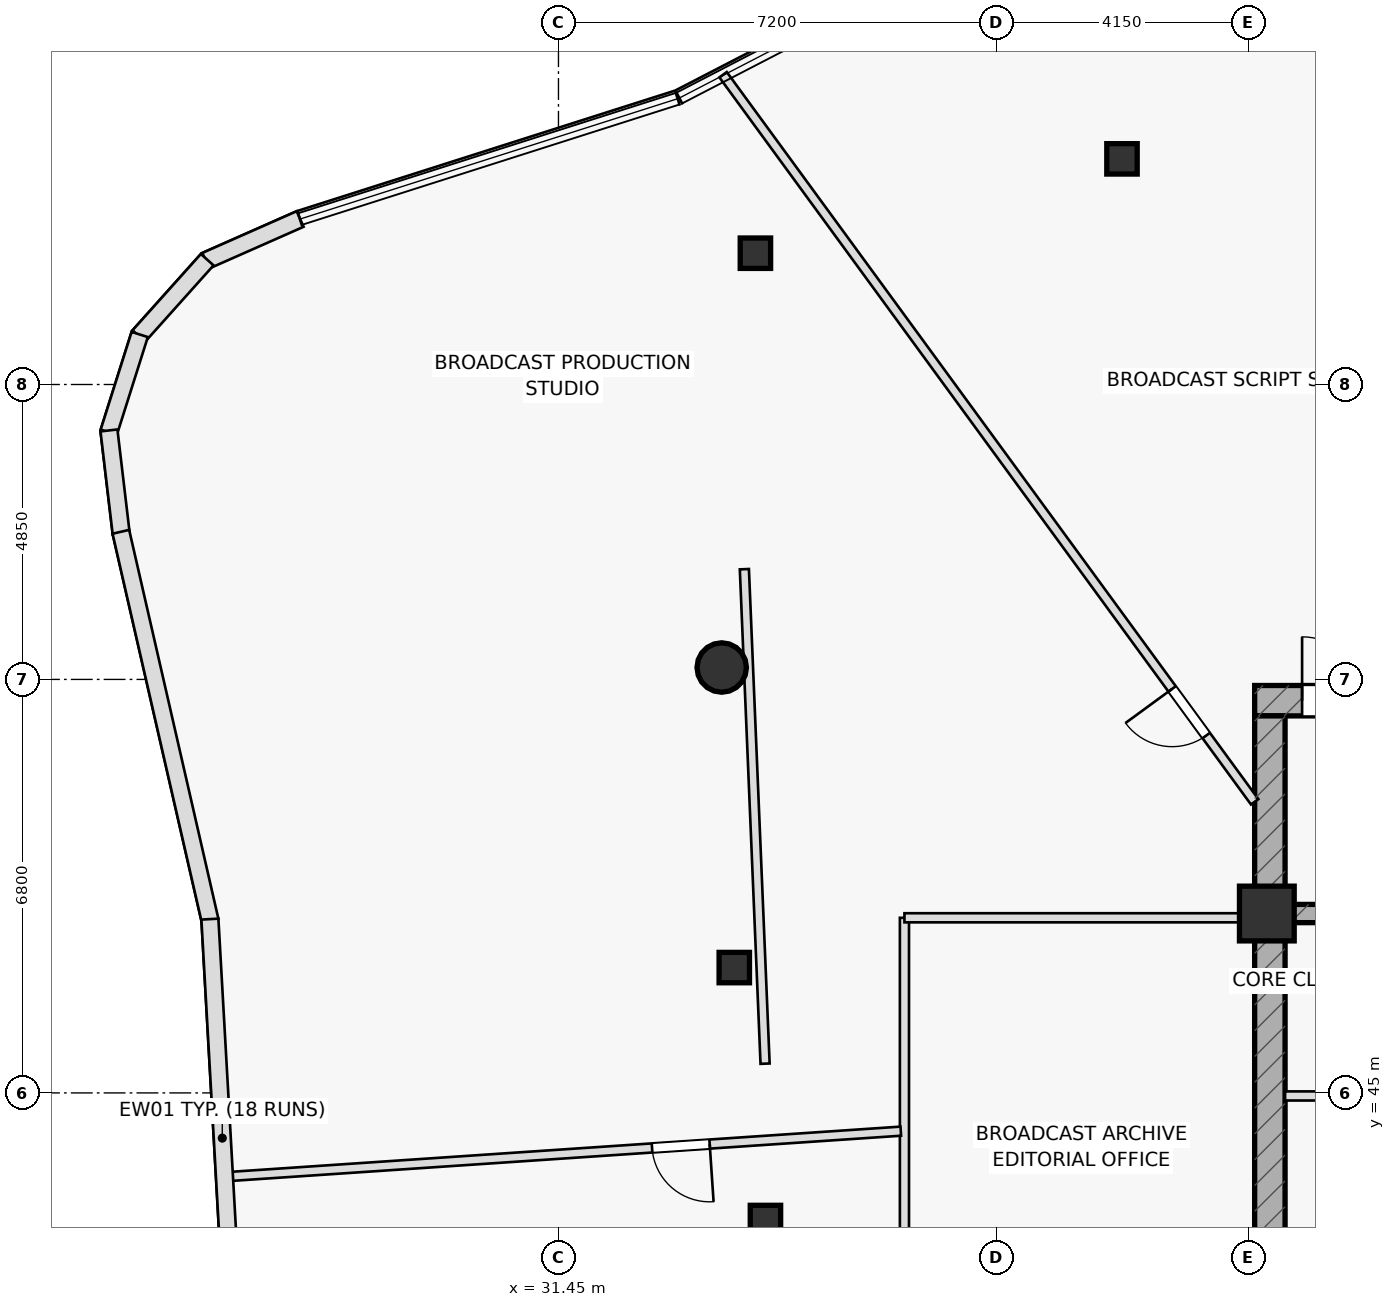
"""IFC4 building model, lengths in metres.
Left out: names, types, materials, properties, quantities, classifications, styles, units other than length and angle.
Written with IfcOpenShell. Run it as: python <this file> out.ifc"""

import sys

from ifc_helpers import new_model, si_unit, direction, frame, frame_2d, origin, origin_2d, place, context, subcontext, project, spatial, rectangle, hollow_rectangle, hollow_circle, extrude, element, fill, save


model = new_model("IFC4")
c1 = context("Model", 3, precision=1e-05, world=origin(), true_north=direction((0.0, 1.0)))
c2 = subcontext(c1, "Body", "Model", "MODEL_VIEW")
j1 = project(units=[si_unit("LENGTHUNIT", "METRE"), si_unit("PLANEANGLEUNIT", "RADIAN")], contexts=[c1])
p1 = place(None, origin())
s1 = spatial("IfcSite", under=j1, at=p1, CompositionType="ELEMENT")
p2 = place(p1, origin())
s2 = spatial("IfcBuilding", under=s1, at=p2, CompositionType="ELEMENT")
p3 = place(p2, frame((0.0, 0.0, 297.5)))
s3 = spatial("IfcBuildingStorey", under=s2, at=p3, CompositionType="ELEMENT", Elevation=297.5)
p4 = place(p3, frame((42.9, 51.45, 0.0), z_axis=(0.0, 0.0, 1.0), x_axis=(1.0, 0.0, 0.0)))
e1 = element("IfcWall", 1, at=p4, inside=s3, PredefinedType="SHEAR", context=c2, shape_type="SweptSolid", body=[
    extrude(rectangle(XDim=14.2, YDim=0.5, at=frame_2d((7.1, 0.0))), origin(), (0.0, 0.0, 1.0), 3.7),
])
p5 = place(p4, frame((0.78, 0.0, 0.0)))
e2 = element("IfcOpeningElement", 2, at=p5, cuts=e1, PredefinedType="OPENING", context=c2, shape_type="SweptSolid", body=[
    extrude(rectangle(XDim=1.05, YDim=2.2, at=frame_2d((0.525, 1.1))), frame((0.0, 0.26, 0.0), z_axis=(0.0, -1.0, 0.0), x_axis=(1.0, 0.0, 0.0)), (0.0, 0.0, 1.0), 0.52),
])
p6 = place(p3, frame((43.15, 38.8, 0.0), z_axis=(0.0, 0.0, 1.0), x_axis=(0.0, 1.0, 0.0)))
e3 = element("IfcWall", 3, at=p6, inside=s3, PredefinedType="SHEAR", context=c2, shape_type="SweptSolid", body=[
    extrude(rectangle(XDim=12.4, YDim=0.5, at=frame_2d((6.2, 0.0))), origin(), (0.0, 0.0, 1.0), 3.7),
])
p7 = place(p3, frame((43.4, 47.95, 0.0), z_axis=(0.0, 0.0, 1.0), x_axis=(1.0, 0.0, 0.0)))
e4 = element("IfcWall", 4, at=p7, inside=s3, PredefinedType="SHEAR", context=c2, shape_type="SweptSolid", body=[
    extrude(rectangle(XDim=13.2, YDim=0.3, at=frame_2d((6.6, 0.0))), origin(), (0.0, 0.0, 1.0), 3.7),
])
p8 = place(p7, frame((8.345, 0.0, 0.0)))
e5 = element("IfcOpeningElement", 5, at=p8, cuts=e4, PredefinedType="OPENING", context=c2, shape_type="SweptSolid", body=[
    extrude(rectangle(XDim=1.15, YDim=2.2, at=frame_2d((0.575, 1.1))), frame((0.0, 0.16, 0.0), z_axis=(0.0, -1.0, 0.0), x_axis=(1.0, 0.0, 0.0)), (0.0, 0.0, 1.0), 0.32),
])
p9 = place(p7, frame((10.065, 0.0, 0.0)))
e6 = element("IfcOpeningElement", 6, at=p9, cuts=e4, PredefinedType="OPENING", context=c2, shape_type="SweptSolid", body=[
    extrude(rectangle(XDim=1.15, YDim=2.2, at=frame_2d((0.575, 1.1))), frame((0.0, 0.16, 0.0), z_axis=(0.0, -1.0, 0.0), x_axis=(1.0, 0.0, 0.0)), (0.0, 0.0, 1.0), 0.32),
])
p10 = place(p7, frame((11.645, 0.0, 0.0)))
e7 = element("IfcOpeningElement", 7, at=p10, cuts=e4, PredefinedType="OPENING", context=c2, shape_type="SweptSolid", body=[
    extrude(rectangle(XDim=1.15, YDim=2.2, at=frame_2d((0.575, 1.1))), frame((0.0, 0.16, 0.0), z_axis=(0.0, -1.0, 0.0), x_axis=(1.0, 0.0, 0.0)), (0.0, 0.0, 1.0), 0.32),
])
p11 = place(p3, frame((43.1, 47.95, 0.0), z_axis=(0.0, 0.0, 1.0), x_axis=(1.0, 0.0, 0.0)))
e8 = element("IfcColumn", 8, at=p11, inside=s3, PredefinedType="COLUMN", context=c2, shape_type="SweptSolid", body=[
    extrude(rectangle(XDim=0.9, YDim=0.9, at=origin_2d()), origin(), (0.0, 0.0, 1.0), 3.7),
])
p12 = place(p3, frame((34.135, 51.996, 0.0), z_axis=(0.0, 0.0, 1.0), x_axis=(1.0, 0.0, 0.0)))
e9 = element("IfcColumn", 9, at=p12, inside=s3, PredefinedType="COLUMN", context=c2, shape_type="SweptSolid", body=[
    extrude(hollow_circle(Radius=0.406, WallThickness=0.036, at=origin_2d()), origin(), (0.0, 0.0, 1.0), 3.7),
])
for number, where, z_axis, x_axis in (
    (10, (34.342, 47.061, 0.0), (0.0, 0.0, 1.0), (1.0, 0.0, 0.0)),
    (11, (34.854, 42.902, 0.0), (0.0, 0.0, 1.0), (1.0, 0.0, 0.0)),
    (12, (40.718, 60.361, 0.0), (0.0, 0.0, 1.0), (1.0, 0.0, 0.0)),
    (13, (34.689, 58.809, 0.0), (0.0, 0.0, 1.0), (1.0, 0.0, 0.0)),
):
    element("IfcColumn", number, at=place(p3, frame(where, z_axis=z_axis, x_axis=x_axis)), inside=s3, PredefinedType="COLUMN", context=c2, shape_type="SweptSolid", body=[
        extrude(hollow_rectangle(XDim=0.5, YDim=0.5, WallThickness=0.03, at=origin_2d()), origin(), (0.0, 0.0, 1.0), 3.7),
    ])
p13 = place(p3, frame((43.4, 44.95, 0.0), z_axis=(0.0, 0.0, 1.0), x_axis=(1.0, 0.0, 0.0)))
e14 = element("IfcWall", 14, at=p13, inside=s3, PredefinedType="PARTITIONING", context=c2, shape_type="SweptSolid", body=[
    extrude(rectangle(XDim=2.35, YDim=0.15, at=frame_2d((1.175, 0.0))), origin(), (0.0, 0.0, 1.0), 3.7),
])
p14 = place(p3, frame((34.507, 53.613, 0.0), z_axis=(0.0, 0.0, 1.0), x_axis=(0.041875090182, -0.999122853718, 0.0)))
e15 = element("IfcWall", 15, at=p14, inside=s3, PredefinedType="PARTITIONING", context=c2, shape_type="SweptSolid", body=[
    extrude(rectangle(XDim=8.139, YDim=0.15, at=frame_2d((4.069, 0.0))), origin(), (0.0, 0.0, 1.0), 3.235),
])
p15 = place(p3, frame((37.14, 40.3, 0.0), z_axis=(0.0, 0.0, 1.0), x_axis=(0.0, 1.0, 0.0)))
e16 = element("IfcWall", 16, at=p15, inside=s3, PredefinedType="PARTITIONING", context=c2, shape_type="SweptSolid", body=[
    extrude(rectangle(XDim=7.58, YDim=0.15, at=frame_2d((3.79, 0.0))), origin(), (0.0, 0.0, 1.0), 3.7),
])
p16 = place(p3, frame((37.14, 47.88, 0.0), z_axis=(0.0, 0.0, 1.0), x_axis=(1.0, 0.0, 0.0)))
e17 = element("IfcWall", 17, at=p16, inside=s3, PredefinedType="PARTITIONING", context=c2, shape_type="SweptSolid", body=[
    extrude(rectangle(XDim=5.76, YDim=0.15, at=frame_2d((2.88, 0.0))), origin(), (0.0, 0.0, 1.0), 3.7),
])
p17 = place(p3, frame((42.9, 49.787, 0.0), z_axis=(0.0, 0.0, 1.0), x_axis=(-0.590195506102, 0.80726034498, 0.0)))
e18 = element("IfcWall", 18, at=p17, inside=s3, PredefinedType="PARTITIONING", context=c2, shape_type="SweptSolid", body=[
    extrude(rectangle(XDim=14.813, YDim=0.15, at=frame_2d((7.406, 0.0))), origin(), (0.0, 0.0, 1.0), 3.175),
])
p18 = place(p17, frame((1.35, 0.0, 0.0)))
e19 = element("IfcOpeningElement", 19, at=p18, cuts=e18, PredefinedType="OPENING", context=c2, shape_type="SweptSolid", body=[
    extrude(rectangle(XDim=0.95, YDim=2.05, at=frame_2d((0.475, 1.025))), frame((0.0, 0.085, 0.0), z_axis=(0.0, -1.0, 0.0), x_axis=(1.0, 0.0, 0.0)), (0.0, 0.0, 1.0), 0.17),
])
p19 = place(p3, frame((37.08, 44.371, 0.0), z_axis=(0.0, 0.0, 1.0), x_axis=(-0.997729729575, -0.067345279876, 0.0)))
e20 = element("IfcWall", 20, at=p19, inside=s3, PredefinedType="PARTITIONING", context=c2, shape_type="SweptSolid", body=[
    extrude(rectangle(XDim=11.158, YDim=0.15, at=frame_2d((5.579, 0.0))), origin(), (0.0, 0.0, 1.0), 3.235),
])
p20 = place(p19, frame((3.15, 0.0, 0.0)))
e21 = element("IfcOpeningElement", 21, at=p20, cuts=e20, PredefinedType="OPENING", context=c2, shape_type="SweptSolid", body=[
    extrude(rectangle(XDim=0.95, YDim=2.05, at=frame_2d((0.475, 1.025))), frame((0.0, 0.085, 0.0), z_axis=(0.0, -1.0, 0.0), x_axis=(1.0, 0.0, 0.0)), (0.0, 0.0, 1.0), 0.17),
])
p21 = place(p3, frame((27.202, 59.372, 0.0), z_axis=(0.0, 0.0, 1.0), x_axis=(-0.914598775381, -0.404362560175, 0.0)))
e22 = element("IfcWall", 22, at=p21, inside=s3, PredefinedType="STANDARD", context=c2, shape_type="SweptSolid", body=[
    extrude(rectangle(XDim=1.697, YDim=0.28, at=frame_2d((0.849, 0.0))), origin(), (0.0, 0.0, 1.0), 3.7),
])
p22 = place(p3, frame((25.673, 58.703, 0.0), z_axis=(0.0, 0.0, 1.0), x_axis=(-0.667226560354, -0.744854829586, 0.0)))
e23 = element("IfcWall", 23, at=p22, inside=s3, PredefinedType="STANDARD", context=c2, shape_type="SweptSolid", body=[
    extrude(rectangle(XDim=1.686, YDim=0.28, at=frame_2d((0.843, 0.0))), origin(), (0.0, 0.0, 1.0), 3.7),
])
p23 = place(p3, frame((24.563, 57.472, 0.0), z_axis=(0.0, 0.0, 1.0), x_axis=(-0.30154723935, -0.953451237579, 0.0)))
e24 = element("IfcWall", 24, at=p23, inside=s3, PredefinedType="STANDARD", context=c2, shape_type="SweptSolid", body=[
    extrude(rectangle(XDim=1.686, YDim=0.28, at=frame_2d((0.843, 0.0))), origin(), (0.0, 0.0, 1.0), 3.7),
])
p24 = place(p3, frame((24.057, 55.895, 0.0), z_axis=(0.0, 0.0, 1.0), x_axis=(0.117629017271, -0.99305760875, 0.0)))
e25 = element("IfcWall", 25, at=p24, inside=s3, PredefinedType="STANDARD", context=c2, shape_type="SweptSolid", body=[
    extrude(rectangle(XDim=1.708, YDim=0.28, at=frame_2d((0.854, 0.0))), origin(), (0.0, 0.0, 1.0), 3.7),
])
p25 = place(p3, frame((24.253, 54.228, 0.0), z_axis=(0.0, 0.0, 1.0), x_axis=(0.22363450058, -0.974673078601, 0.0)))
e26 = element("IfcWall", 26, at=p25, inside=s3, PredefinedType="STANDARD", context=c2, shape_type="SweptSolid", body=[
    extrude(rectangle(XDim=6.565, YDim=0.28, at=frame_2d((3.283, 0.0))), origin(), (0.0, 0.0, 1.0), 3.7),
])
p26 = place(p3, frame((25.717, 47.858, 0.0), z_axis=(0.0, 0.0, 1.0), x_axis=(0.056442668845, -0.998405841897, 0.0)))
e27 = element("IfcWall", 27, at=p26, inside=s3, PredefinedType="STANDARD", context=c2, shape_type="SweptSolid", body=[
    extrude(rectangle(XDim=7.215, YDim=0.28, at=frame_2d((3.607, 0.0))), origin(), (0.0, 0.0, 1.0), 3.7),
])
p27 = place(p5, origin())
e28 = element("IfcDoor", 28, at=p27, inside=s3, OperationType="SINGLE_SWING_LEFT", PredefinedType="DOOR", context=c2, shape_type="SweptSolid", body=[
    extrude(rectangle(XDim=1.05, YDim=2.2, at=frame_2d((0.525, 1.1))), frame((0.0, 0.025, 0.0), z_axis=(0.0, -1.0, 0.0), x_axis=(1.0, 0.0, 0.0)), (0.0, 0.0, 1.0), 0.05),
])
fill(e2, e28)
p28 = place(p18, origin())
e29 = element("IfcDoor", 29, at=p28, inside=s3, OperationType="SINGLE_SWING_RIGHT", PredefinedType="DOOR", context=c2, shape_type="SweptSolid", body=[
    extrude(rectangle(XDim=0.95, YDim=2.05, at=frame_2d((0.475, 1.025))), frame((0.0, 0.025, 0.0), z_axis=(0.0, -1.0, 0.0), x_axis=(1.0, 0.0, 0.0)), (0.0, 0.0, 1.0), 0.05),
])
fill(e19, e29)
p29 = place(p20, origin())
e30 = element("IfcDoor", 30, at=p29, inside=s3, OperationType="SINGLE_SWING_LEFT", PredefinedType="DOOR", context=c2, shape_type="SweptSolid", body=[
    extrude(rectangle(XDim=0.95, YDim=2.05, at=frame_2d((0.475, 1.025))), frame((0.0, 0.025, 0.0), z_axis=(0.0, -1.0, 0.0), x_axis=(1.0, 0.0, 0.0)), (0.0, 0.0, 1.0), 0.05),
])
fill(e21, e30)
save(model, sys.argv[1])
